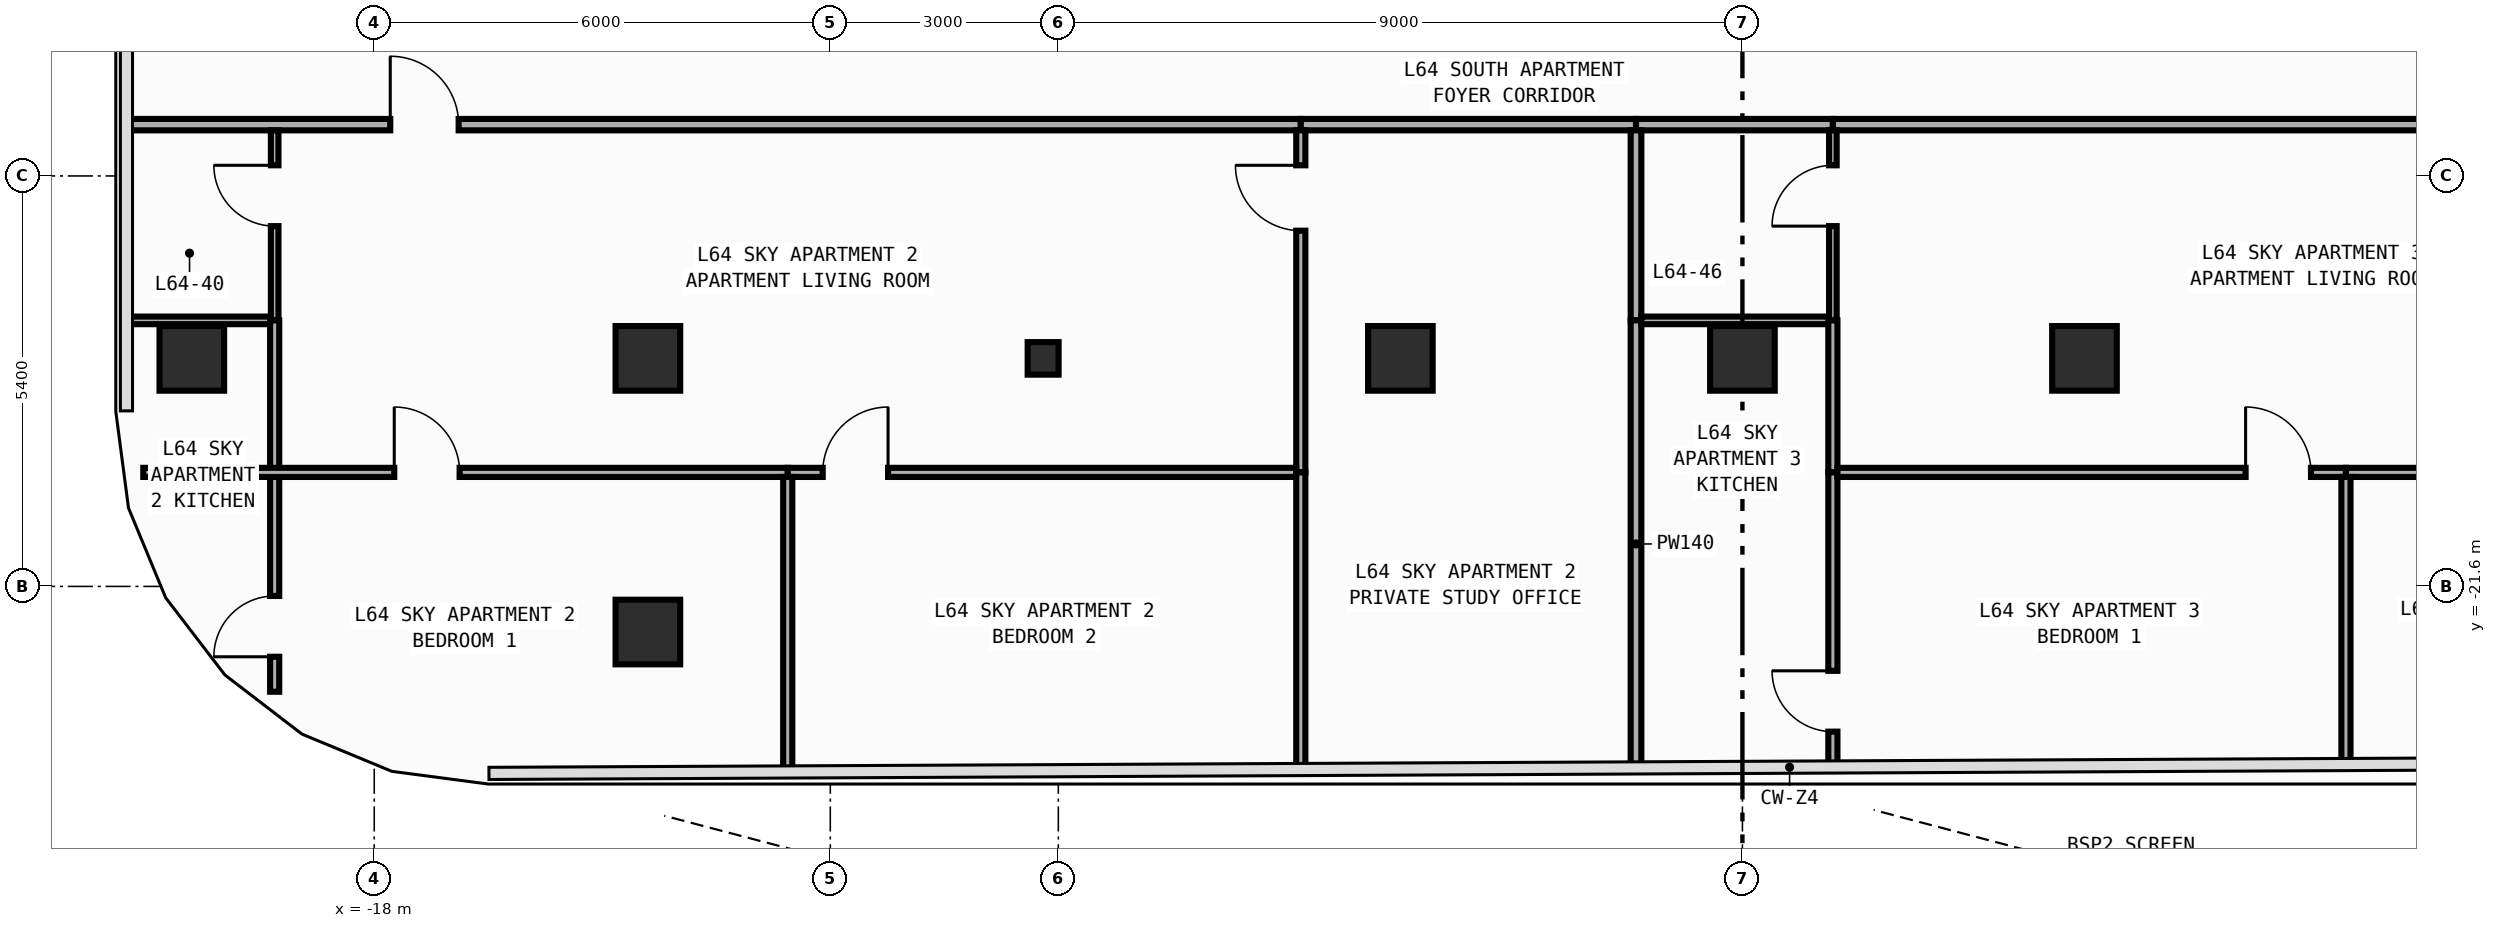
"""IFC4 building model, lengths in metres.
Left out: names, types, materials, properties, quantities, classifications, styles, units other than length and angle.
Written with IfcOpenShell. Run it as: python <this file> out.ifc"""

import sys

from ifc_helpers import new_model, si_unit, direction, frame, frame_2d, origin, origin_2d, place, context, subcontext, project, spatial, rectangle, i_section, extrude, element, fill, save


model = new_model("IFC4")
c1 = context("Model", 3, precision=1e-05, world=origin(), true_north=direction((0.0, 1.0)))
c2 = subcontext(c1, "Body", "Model", "MODEL_VIEW")
j1 = project(units=[si_unit("LENGTHUNIT", "METRE"), si_unit("PLANEANGLEUNIT", "RADIAN")], contexts=[c1])
p1 = place(None, origin())
s1 = spatial("IfcSite", under=j1, at=p1, CompositionType="ELEMENT")
p2 = place(p1, origin())
s2 = spatial("IfcBuilding", under=s1, at=p2, CompositionType="ELEMENT")
p3 = place(p2, frame((0.0, 0.0, 269.2)))
s3 = spatial("IfcBuildingStorey", under=s2, at=p3, CompositionType="ELEMENT", Elevation=269.2)
p4 = place(p3, frame((-9.2, -18.6, 0.0), z_axis=(0.0, 0.0, 1.0), x_axis=(1.0, 0.0, 0.0)))
e1 = element("IfcColumn", 1, at=p4, inside=s3, PredefinedType="COLUMN", context=c2, shape_type="SweptSolid", body=[
    extrude(i_section(OverallWidth=0.407, OverallDepth=0.428, WebThickness=0.02, FlangeThickness=0.035, FilletRadius=0.022, at=origin_2d()), origin(), (0.0, 0.0, 1.0), 3.6),
])
for number, where, z_axis, x_axis in (
    (2, (-20.4, -18.6, 0.0), (0.0, 0.0, 1.0), (1.0, 0.0, 0.0)),
    (3, (-14.4, -18.6, 0.0), (0.0, 0.0, 1.0), (1.0, 0.0, 0.0)),
    (4, (-4.5, -18.6, 0.0), (0.0, 0.0, 1.0), (1.0, 0.0, 0.0)),
    (5, (0.0, -18.6, 0.0), (0.0, 0.0, 1.0), (1.0, 0.0, 0.0)),
    (6, (4.5, -18.6, 0.0), (0.0, 0.0, 1.0), (1.0, 0.0, 0.0)),
    (7, (-14.4, -22.2, 0.0), (0.0, 0.0, 1.0), (1.0, 0.0, 0.0)),
):
    element("IfcColumn", number, at=place(p3, frame(where, z_axis=z_axis, x_axis=x_axis)), inside=s3, PredefinedType="COLUMN", context=c2, shape_type="SweptSolid", body=[
        extrude(rectangle(XDim=0.85, YDim=0.85, at=origin_2d()), origin(), (0.0, 0.0, 1.0), 3.6),
    ])
p5 = place(p3, frame((-21.255, -15.525, 0.0), z_axis=(0.0, 0.0, 1.0), x_axis=(1.0, 0.0, 0.0)))
e8 = element("IfcWall", 8, at=p5, inside=s3, PredefinedType="PARTITIONING", context=c2, shape_type="SweptSolid", body=[
    extrude(rectangle(XDim=15.445, YDim=0.15, at=frame_2d((7.722, 0.0))), origin(), (0.0, 0.0, 1.0), 3.25),
])
p6 = place(p5, frame((3.466, 0.0, 0.0)))
e9 = element("IfcOpeningElement", 9, at=p6, cuts=e8, PredefinedType="OPENING", context=c2, shape_type="SweptSolid", body=[
    extrude(rectangle(XDim=0.9, YDim=2.15, at=frame_2d((0.45, 1.075))), frame((0.0, 0.085, 0.0), z_axis=(0.0, -1.0, 0.0), x_axis=(1.0, 0.0, 0.0)), (0.0, 0.0, 1.0), 0.17),
])
p7 = place(p3, frame((-5.81, -15.525, 0.0), z_axis=(0.0, 0.0, 1.0), x_axis=(1.0, 0.0, 0.0)))
e10 = element("IfcWall", 10, at=p7, inside=s3, PredefinedType="PARTITIONING", context=c2, shape_type="SweptSolid", body=[
    extrude(rectangle(XDim=4.41, YDim=0.15, at=frame_2d((2.205, 0.0))), origin(), (0.0, 0.0, 1.0), 3.25),
])
p8 = place(p3, frame((-1.4, -15.525, 0.0), z_axis=(0.0, 0.0, 1.0), x_axis=(1.0, 0.0, 0.0)))
e11 = element("IfcWall", 11, at=p8, inside=s3, PredefinedType="PARTITIONING", context=c2, shape_type="SweptSolid", body=[
    extrude(rectangle(XDim=2.59, YDim=0.15, at=frame_2d((1.295, 0.0))), origin(), (0.0, 0.0, 1.0), 3.25),
])
p9 = place(p3, frame((1.19, -15.525, 0.0), z_axis=(0.0, 0.0, 1.0), x_axis=(1.0, 0.0, 0.0)))
e12 = element("IfcWall", 12, at=p9, inside=s3, PredefinedType="PARTITIONING", context=c2, shape_type="SweptSolid", body=[
    extrude(rectangle(XDim=11.05, YDim=0.15, at=frame_2d((5.525, 0.0))), origin(), (0.0, 0.0, 1.0), 3.25),
])
p10 = place(p9, frame((9.69, 0.0, 0.0)))
e13 = element("IfcOpeningElement", 13, at=p10, cuts=e12, PredefinedType="OPENING", context=c2, shape_type="SweptSolid", body=[
    extrude(rectangle(XDim=0.9, YDim=2.15, at=frame_2d((0.45, 1.075))), frame((0.0, 0.085, 0.0), z_axis=(0.0, -1.0, 0.0), x_axis=(1.0, 0.0, 0.0)), (0.0, 0.0, 1.0), 0.17),
])
p11 = place(p3, frame((-21.255, -18.1, 0.0), z_axis=(0.0, 0.0, 1.0), x_axis=(1.0, 0.0, 0.0)))
e14 = element("IfcWall", 14, at=p11, inside=s3, PredefinedType="PARTITIONING", context=c2, shape_type="SweptSolid", body=[
    extrude(rectangle(XDim=1.895, YDim=0.1, at=frame_2d((0.947, 0.0))), origin(), (0.0, 0.0, 1.0), 3.25),
])
p12 = place(p3, frame((-19.31, -18.1, 0.0), z_axis=(0.0, 0.0, 1.0), x_axis=(0.0, 1.0, 0.0)))
e15 = element("IfcWall", 15, at=p12, inside=s3, PredefinedType="PARTITIONING", context=c2, shape_type="SweptSolid", body=[
    extrude(rectangle(XDim=2.5, YDim=0.1, at=frame_2d((1.25, 0.0))), origin(), (0.0, 0.0, 1.0), 3.25),
])
p13 = place(p12, frame((1.24, 0.0, 0.0)))
e16 = element("IfcOpeningElement", 16, at=p13, cuts=e15, PredefinedType="OPENING", context=c2, shape_type="SweptSolid", body=[
    extrude(rectangle(XDim=0.8, YDim=2.1, at=frame_2d((0.4, 1.05))), frame((0.0, 0.06, 0.0), z_axis=(0.0, -1.0, 0.0), x_axis=(1.0, 0.0, 0.0)), (0.0, 0.0, 1.0), 0.12),
])
p14 = place(p3, frame((-19.31, -20.1, 0.0), z_axis=(0.0, 0.0, 1.0), x_axis=(0.0, 1.0, 0.0)))
e17 = element("IfcWall", 17, at=p14, inside=s3, PredefinedType="PARTITIONING", context=c2, shape_type="SweptSolid", body=[
    extrude(rectangle(XDim=2.0, YDim=0.12, at=frame_2d((1.0, 0.0))), origin(), (0.0, 0.0, 1.0), 3.25),
])
p15 = place(p3, frame((-19.31, -22.986, 0.0), z_axis=(0.0, 0.0, 1.0), x_axis=(0.0, 1.0, 0.0)))
e18 = element("IfcWall", 18, at=p15, inside=s3, PredefinedType="PARTITIONING", context=c2, shape_type="SweptSolid", body=[
    extrude(rectangle(XDim=2.885, YDim=0.12, at=frame_2d((1.443, 0.0))), origin(), (0.0, 0.0, 1.0), 3.25),
])
p16 = place(p15, frame((0.46, 0.0, 0.0)))
e19 = element("IfcOpeningElement", 19, at=p16, cuts=e18, PredefinedType="OPENING", context=c2, shape_type="SweptSolid", body=[
    extrude(rectangle(XDim=0.8, YDim=2.1, at=frame_2d((0.4, 1.05))), frame((0.0, 0.07, 0.0), z_axis=(0.0, -1.0, 0.0), x_axis=(1.0, 0.0, 0.0)), (0.0, 0.0, 1.0), 0.14),
])
p17 = place(p3, frame((-5.81, -20.1, 0.0), z_axis=(0.0, 0.0, 1.0), x_axis=(0.0, 1.0, 0.0)))
e20 = element("IfcWall", 20, at=p17, inside=s3, PredefinedType="PARTITIONING", context=c2, shape_type="SweptSolid", body=[
    extrude(rectangle(XDim=4.5, YDim=0.12, at=frame_2d((2.25, 0.0))), origin(), (0.0, 0.0, 1.0), 3.25),
])
p18 = place(p17, frame((3.18, 0.0, 0.0)))
e21 = element("IfcOpeningElement", 21, at=p18, cuts=e20, PredefinedType="OPENING", context=c2, shape_type="SweptSolid", body=[
    extrude(rectangle(XDim=0.86, YDim=2.15, at=frame_2d((0.43, 1.075))), frame((0.0, 0.07, 0.0), z_axis=(0.0, -1.0, 0.0), x_axis=(1.0, 0.0, 0.0)), (0.0, 0.0, 1.0), 0.14),
])
p19 = place(p3, frame((-21.039, -20.1, 0.0), z_axis=(0.0, 0.0, 1.0), x_axis=(1.0, 0.0, 0.0)))
e22 = element("IfcWall", 22, at=p19, inside=s3, PredefinedType="PARTITIONING", context=c2, shape_type="SweptSolid", body=[
    extrude(rectangle(XDim=8.479, YDim=0.12, at=frame_2d((4.239, 0.0))), origin(), (0.0, 0.0, 1.0), 3.25),
])
p20 = place(p19, frame((3.302, 0.0, 0.0)))
e23 = element("IfcOpeningElement", 23, at=p20, cuts=e22, PredefinedType="OPENING", context=c2, shape_type="SweptSolid", body=[
    extrude(rectangle(XDim=0.86, YDim=2.15, at=frame_2d((0.43, 1.075))), frame((0.0, 0.07, 0.0), z_axis=(0.0, -1.0, 0.0), x_axis=(1.0, 0.0, 0.0)), (0.0, 0.0, 1.0), 0.14),
])
p21 = place(p3, frame((-12.56, -20.1, 0.0), z_axis=(0.0, 0.0, 1.0), x_axis=(1.0, 0.0, 0.0)))
e24 = element("IfcWall", 24, at=p21, inside=s3, PredefinedType="PARTITIONING", context=c2, shape_type="SweptSolid", body=[
    extrude(rectangle(XDim=6.69, YDim=0.12, at=frame_2d((3.345, 0.0))), origin(), (0.0, 0.0, 1.0), 3.25),
])
p22 = place(p21, frame((0.46, 0.0, 0.0)))
e25 = element("IfcOpeningElement", 25, at=p22, cuts=e24, PredefinedType="OPENING", context=c2, shape_type="SweptSolid", body=[
    extrude(rectangle(XDim=0.86, YDim=2.15, at=frame_2d((0.43, 1.075))), frame((0.0, 0.07, 0.0), z_axis=(0.0, -1.0, 0.0), x_axis=(1.0, 0.0, 0.0)), (0.0, 0.0, 1.0), 0.14),
])
p23 = place(p3, frame((-5.81, -24.004, 0.0), z_axis=(0.0, 0.0, 1.0), x_axis=(0.0, 1.0, 0.0)))
e26 = element("IfcWall", 26, at=p23, inside=s3, PredefinedType="PARTITIONING", context=c2, shape_type="SweptSolid", body=[
    extrude(rectangle(XDim=3.904, YDim=0.12, at=frame_2d((1.952, 0.0))), origin(), (0.0, 0.0, 1.0), 3.25),
])
p24 = place(p3, frame((-1.4, -18.1, 0.0), z_axis=(0.0, 0.0, 1.0), x_axis=(0.0, 1.0, 0.0)))
e27 = element("IfcWall", 27, at=p24, inside=s3, PredefinedType="PARTITIONING", context=c2, shape_type="SweptSolid", body=[
    extrude(rectangle(XDim=2.5, YDim=0.14, at=frame_2d((1.25, 0.0))), origin(), (0.0, 0.0, 1.0), 3.25),
])
p25 = place(p3, frame((-1.4, -23.983, 0.0), z_axis=(0.0, 0.0, 1.0), x_axis=(0.0, 1.0, 0.0)))
e28 = element("IfcWall", 28, at=p25, inside=s3, PredefinedType="PARTITIONING", context=c2, shape_type="SweptSolid", body=[
    extrude(rectangle(XDim=5.883, YDim=0.14, at=frame_2d((2.941, 0.0))), origin(), (0.0, 0.0, 1.0), 3.25),
])
p26 = place(p3, frame((-12.56, -24.036, 0.0), z_axis=(0.0, 0.0, 1.0), x_axis=(0.0, 1.0, 0.0)))
e29 = element("IfcWall", 29, at=p26, inside=s3, PredefinedType="PARTITIONING", context=c2, shape_type="SweptSolid", body=[
    extrude(rectangle(XDim=3.876, YDim=0.12, at=frame_2d((1.938, 0.0))), origin(), (0.0, 0.0, 1.0), 3.25),
])
p27 = place(p3, frame((-1.33, -18.1, 0.0), z_axis=(0.0, 0.0, 1.0), x_axis=(1.0, 0.0, 0.0)))
e30 = element("IfcWall", 30, at=p27, inside=s3, PredefinedType="PARTITIONING", context=c2, shape_type="SweptSolid", body=[
    extrude(rectangle(XDim=2.47, YDim=0.1, at=frame_2d((1.235, 0.0))), origin(), (0.0, 0.0, 1.0), 3.25),
])
p28 = place(p3, frame((1.19, -18.1, 0.0), z_axis=(0.0, 0.0, 1.0), x_axis=(0.0, 1.0, 0.0)))
e31 = element("IfcWall", 31, at=p28, inside=s3, PredefinedType="PARTITIONING", context=c2, shape_type="SweptSolid", body=[
    extrude(rectangle(XDim=2.5, YDim=0.1, at=frame_2d((1.25, 0.0))), origin(), (0.0, 0.0, 1.0), 3.25),
])
p29 = place(p28, frame((1.24, 0.0, 0.0)))
e32 = element("IfcOpeningElement", 32, at=p29, cuts=e31, PredefinedType="OPENING", context=c2, shape_type="SweptSolid", body=[
    extrude(rectangle(XDim=0.8, YDim=2.1, at=frame_2d((0.4, 1.05))), frame((0.0, 0.06, 0.0), z_axis=(0.0, -1.0, 0.0), x_axis=(1.0, 0.0, 0.0)), (0.0, 0.0, 1.0), 0.12),
])
p30 = place(p3, frame((1.19, -20.1, 0.0), z_axis=(0.0, 0.0, 1.0), x_axis=(0.0, 1.0, 0.0)))
e33 = element("IfcWall", 33, at=p30, inside=s3, PredefinedType="PARTITIONING", context=c2, shape_type="SweptSolid", body=[
    extrude(rectangle(XDim=2.0, YDim=0.12, at=frame_2d((1.0, 0.0))), origin(), (0.0, 0.0, 1.0), 3.25),
])
p31 = place(p3, frame((1.19, -23.971, 0.0), z_axis=(0.0, 0.0, 1.0), x_axis=(0.0, 1.0, 0.0)))
e34 = element("IfcWall", 34, at=p31, inside=s3, PredefinedType="PARTITIONING", context=c2, shape_type="SweptSolid", body=[
    extrude(rectangle(XDim=3.871, YDim=0.12, at=frame_2d((1.935, 0.0))), origin(), (0.0, 0.0, 1.0), 3.25),
])
p32 = place(p31, frame((0.46, 0.0, 0.0)))
e35 = element("IfcOpeningElement", 35, at=p32, cuts=e34, PredefinedType="OPENING", context=c2, shape_type="SweptSolid", body=[
    extrude(rectangle(XDim=0.8, YDim=2.1, at=frame_2d((0.4, 1.05))), frame((0.0, 0.07, 0.0), z_axis=(0.0, -1.0, 0.0), x_axis=(1.0, 0.0, 0.0)), (0.0, 0.0, 1.0), 0.14),
])
p33 = place(p3, frame((1.25, -20.1, 0.0), z_axis=(0.0, 0.0, 1.0), x_axis=(1.0, 0.0, 0.0)))
e36 = element("IfcWall", 36, at=p33, inside=s3, PredefinedType="PARTITIONING", context=c2, shape_type="SweptSolid", body=[
    extrude(rectangle(XDim=6.69, YDim=0.12, at=frame_2d((3.345, 0.0))), origin(), (0.0, 0.0, 1.0), 3.25),
])
p34 = place(p33, frame((5.37, 0.0, 0.0)))
e37 = element("IfcOpeningElement", 37, at=p34, cuts=e36, PredefinedType="OPENING", context=c2, shape_type="SweptSolid", body=[
    extrude(rectangle(XDim=0.86, YDim=2.15, at=frame_2d((0.43, 1.075))), frame((0.0, 0.07, 0.0), z_axis=(0.0, -1.0, 0.0), x_axis=(1.0, 0.0, 0.0)), (0.0, 0.0, 1.0), 0.14),
])
p35 = place(p3, frame((7.94, -20.1, 0.0), z_axis=(0.0, 0.0, 1.0), x_axis=(1.0, 0.0, 0.0)))
e38 = element("IfcWall", 38, at=p35, inside=s3, PredefinedType="PARTITIONING", context=c2, shape_type="SweptSolid", body=[
    extrude(rectangle(XDim=6.81, YDim=0.12, at=frame_2d((3.405, 0.0))), origin(), (0.0, 0.0, 1.0), 3.25),
])
p36 = place(p35, frame((3.076, 0.0, 0.0)))
e39 = element("IfcOpeningElement", 39, at=p36, cuts=e38, PredefinedType="OPENING", context=c2, shape_type="SweptSolid", body=[
    extrude(rectangle(XDim=0.86, YDim=2.15, at=frame_2d((0.43, 1.075))), frame((0.0, 0.07, 0.0), z_axis=(0.0, -1.0, 0.0), x_axis=(1.0, 0.0, 0.0)), (0.0, 0.0, 1.0), 0.14),
])
p37 = place(p3, frame((7.94, -23.938, 0.0), z_axis=(0.0, 0.0, 1.0), x_axis=(0.0, 1.0, 0.0)))
e40 = element("IfcWall", 40, at=p37, inside=s3, PredefinedType="PARTITIONING", context=c2, shape_type="SweptSolid", body=[
    extrude(rectangle(XDim=3.779, YDim=0.12, at=frame_2d((1.889, 0.0))), origin(), (0.0, 0.0, 1.0), 3.25),
])
p38 = place(p6, origin())
e41 = element("IfcDoor", 41, at=p38, inside=s3, OperationType="SINGLE_SWING_LEFT", PredefinedType="DOOR", context=c2, shape_type="SweptSolid", body=[
    extrude(rectangle(XDim=0.9, YDim=2.15, at=frame_2d((0.45, 1.075))), frame((0.0, 0.025, 0.0), z_axis=(0.0, -1.0, 0.0), x_axis=(1.0, 0.0, 0.0)), (0.0, 0.0, 1.0), 0.05),
])
fill(e9, e41)
p39 = place(p13, origin())
e42 = element("IfcDoor", 42, at=p39, inside=s3, OperationType="SINGLE_SWING_RIGHT", PredefinedType="DOOR", context=c2, shape_type="SweptSolid", body=[
    extrude(rectangle(XDim=0.8, YDim=2.1, at=frame_2d((0.4, 1.05))), frame((0.0, 0.025, 0.0), z_axis=(0.0, -1.0, 0.0), x_axis=(1.0, 0.0, 0.0)), (0.0, 0.0, 1.0), 0.05),
])
fill(e16, e42)
p40 = place(p18, origin())
e43 = element("IfcDoor", 43, at=p40, inside=s3, OperationType="SINGLE_SWING_RIGHT", PredefinedType="DOOR", context=c2, shape_type="SweptSolid", body=[
    extrude(rectangle(XDim=0.86, YDim=2.15, at=frame_2d((0.43, 1.075))), frame((0.0, 0.025, 0.0), z_axis=(0.0, -1.0, 0.0), x_axis=(1.0, 0.0, 0.0)), (0.0, 0.0, 1.0), 0.05),
])
fill(e21, e43)
p41 = place(p20, origin())
e44 = element("IfcDoor", 44, at=p41, inside=s3, OperationType="SINGLE_SWING_LEFT", PredefinedType="DOOR", context=c2, shape_type="SweptSolid", body=[
    extrude(rectangle(XDim=0.86, YDim=2.15, at=frame_2d((0.43, 1.075))), frame((0.0, 0.025, 0.0), z_axis=(0.0, -1.0, 0.0), x_axis=(1.0, 0.0, 0.0)), (0.0, 0.0, 1.0), 0.05),
])
fill(e23, e44)
p42 = place(p22, origin())
e45 = element("IfcDoor", 45, at=p42, inside=s3, OperationType="SINGLE_SWING_RIGHT", PredefinedType="DOOR", context=c2, shape_type="SweptSolid", body=[
    extrude(rectangle(XDim=0.86, YDim=2.15, at=frame_2d((0.43, 1.075))), frame((0.0, 0.025, 0.0), z_axis=(0.0, -1.0, 0.0), x_axis=(1.0, 0.0, 0.0)), (0.0, 0.0, 1.0), 0.05),
])
fill(e25, e45)
p43 = place(p29, origin())
e46 = element("IfcDoor", 46, at=p43, inside=s3, OperationType="SINGLE_SWING_LEFT", PredefinedType="DOOR", context=c2, shape_type="SweptSolid", body=[
    extrude(rectangle(XDim=0.8, YDim=2.1, at=frame_2d((0.4, 1.05))), frame((0.0, 0.025, 0.0), z_axis=(0.0, -1.0, 0.0), x_axis=(1.0, 0.0, 0.0)), (0.0, 0.0, 1.0), 0.05),
])
fill(e32, e46)
p44 = place(p34, origin())
e47 = element("IfcDoor", 47, at=p44, inside=s3, OperationType="SINGLE_SWING_LEFT", PredefinedType="DOOR", context=c2, shape_type="SweptSolid", body=[
    extrude(rectangle(XDim=0.86, YDim=2.15, at=frame_2d((0.43, 1.075))), frame((0.0, 0.025, 0.0), z_axis=(0.0, -1.0, 0.0), x_axis=(1.0, 0.0, 0.0)), (0.0, 0.0, 1.0), 0.05),
])
fill(e37, e47)
p45 = place(p32, origin())
e48 = element("IfcDoor", 48, at=p45, inside=s3, OperationType="SINGLE_SWING_RIGHT", PredefinedType="DOOR", context=c2, shape_type="SweptSolid", body=[
    extrude(rectangle(XDim=0.8, YDim=2.1, at=frame_2d((0.4, 1.05))), frame((0.0, 0.025, 0.0), z_axis=(0.0, -1.0, 0.0), x_axis=(1.0, 0.0, 0.0)), (0.0, 0.0, 1.0), 0.05),
])
fill(e35, e48)
p46 = place(p16, origin())
e49 = element("IfcDoor", 49, at=p46, inside=s3, OperationType="SINGLE_SWING_LEFT", PredefinedType="DOOR", context=c2, shape_type="SweptSolid", body=[
    extrude(rectangle(XDim=0.8, YDim=2.1, at=frame_2d((0.4, 1.05))), frame((0.0, 0.025, 0.0), z_axis=(0.0, -1.0, 0.0), x_axis=(1.0, 0.0, 0.0)), (0.0, 0.0, 1.0), 0.05),
])
fill(e19, e49)
save(model, sys.argv[1])
